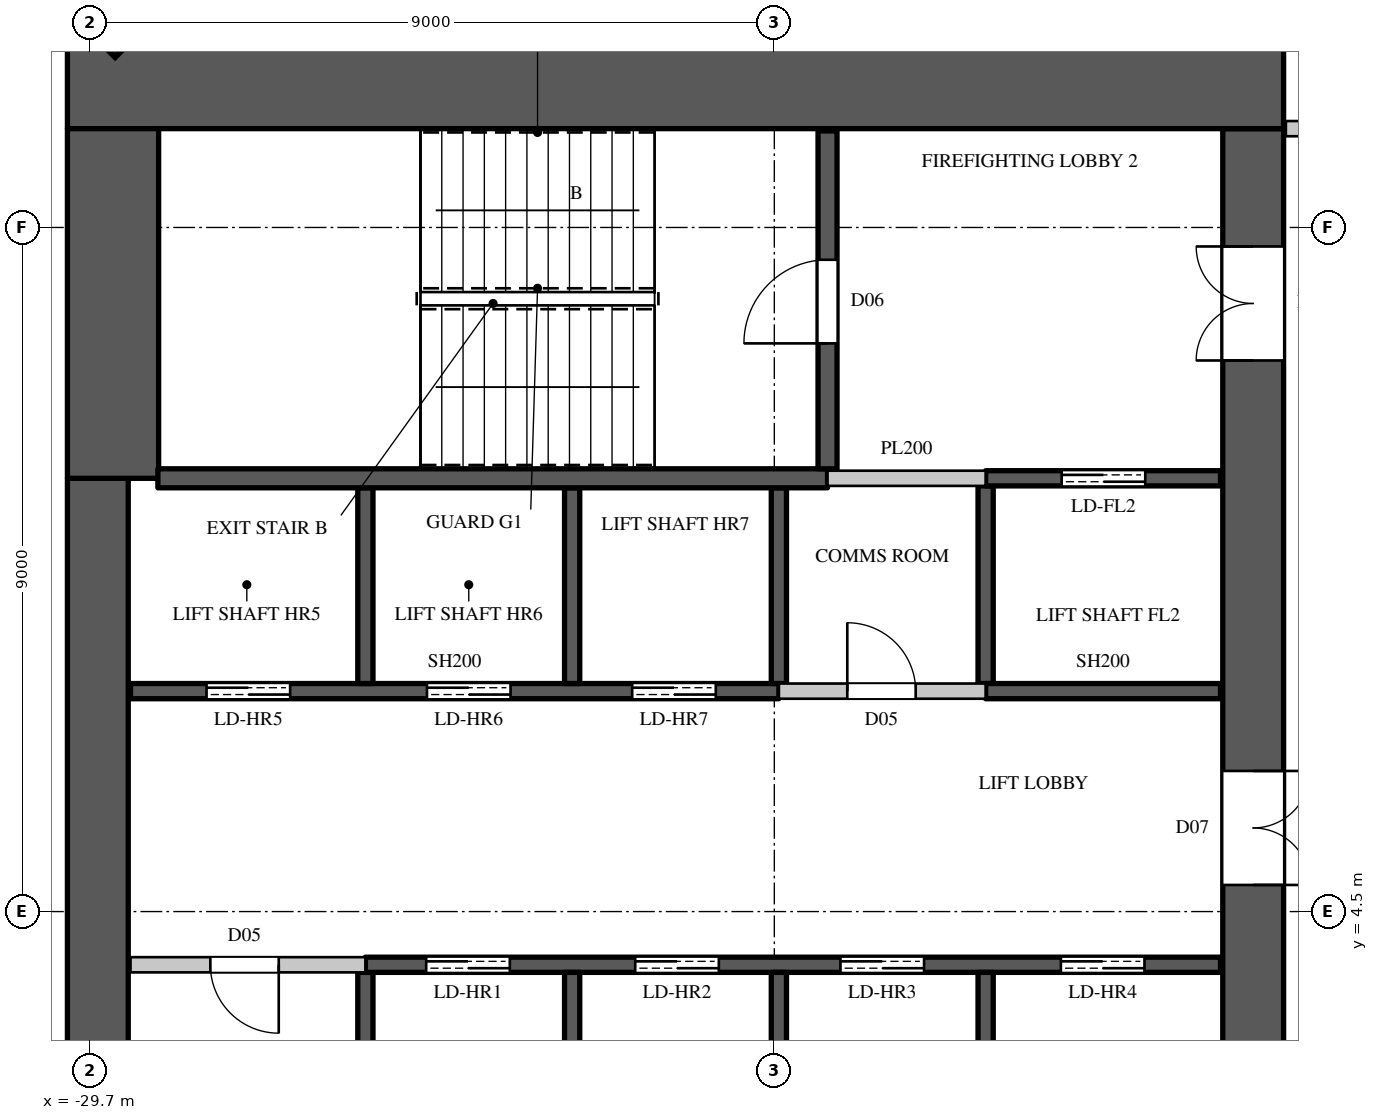
"""IFC4 building model, lengths in metres.
Left out: names, types, materials, properties, quantities, classifications, styles, units other than length and angle.
Written with IfcOpenShell. Run it as: python <this file> out.ifc"""

import sys

from ifc_helpers import new_model, si_unit, direction, frame, frame_2d, origin, origin_2d, place, context, subcontext, project, spatial, rectangle, extrude, element, fill, save


model = new_model("IFC4")
c1 = context("Model", 3, precision=1e-05, world=origin(), true_north=direction((0.0, 1.0)))
c2 = subcontext(c1, "Body", "Model", "MODEL_VIEW")
j1 = project(units=[si_unit("LENGTHUNIT", "METRE"), si_unit("PLANEANGLEUNIT", "RADIAN")], contexts=[c1])
p1 = place(None, origin())
s1 = spatial("IfcSite", under=j1, at=p1, CompositionType="ELEMENT")
p2 = place(p1, origin())
s2 = spatial("IfcBuilding", under=s1, at=p2, CompositionType="ELEMENT")
p3 = place(p2, frame((0.0, 0.0, 176.9)))
s3 = spatial("IfcBuildingStorey", under=s2, at=p3, CompositionType="ELEMENT", Elevation=176.9)
p4 = place(p3, frame((-29.443, 16.443, 0.0), z_axis=(0.0, 0.0, 1.0), x_axis=(-0.707106781187, -0.707106781187, 0.0)))
e1 = element("IfcColumn", 1, at=p4, inside=s3, PredefinedType="COLUMN", context=c2, shape_type="SweptSolid", body=[
    extrude(rectangle(XDim=0.9, YDim=1.1, at=origin_2d()), origin(), (0.0, 0.0, 1.0), 4.1),
])
p5 = place(p3, frame((-30.0, 15.4, 0.0), z_axis=(0.0, 0.0, 1.0), x_axis=(1.0, 0.0, 0.0)))
e2 = element("IfcWall", 2, at=p5, inside=s3, PredefinedType="SHEAR", context=c2, shape_type="SweptSolid", body=[
    extrude(rectangle(XDim=16.0, YDim=1.2, at=frame_2d((8.0, 0.0))), origin(), (0.0, 0.0, 1.0), 4.1),
])
p6 = place(p3, frame((-14.4, -14.8, 0.0), z_axis=(0.0, 0.0, 1.0), x_axis=(0.0, 1.0, 0.0)))
e3 = element("IfcWall", 3, at=p6, inside=s3, PredefinedType="SHEAR", context=c2, shape_type="SweptSolid", body=[
    extrude(rectangle(XDim=29.6, YDim=0.8, at=frame_2d((14.8, 0.0))), origin(), (0.0, 0.0, 1.0), 4.1),
])
p7 = place(p6, frame((1.55, 0.0, 0.0)))
e4 = element("IfcOpeningElement", 4, at=p7, cuts=e3, PredefinedType="OPENING", context=c2, shape_type="SweptSolid", body=[
    extrude(rectangle(XDim=1.5, YDim=2.4, at=frame_2d((0.75, 1.2))), frame((0.0, 0.41, 0.0), z_axis=(0.0, -1.0, 0.0), x_axis=(1.0, 0.0, 0.0)), (0.0, 0.0, 1.0), 0.82),
])
p8 = place(p6, frame((26.55, 0.0, 0.0)))
e5 = element("IfcOpeningElement", 5, at=p8, cuts=e3, PredefinedType="OPENING", context=c2, shape_type="SweptSolid", body=[
    extrude(rectangle(XDim=1.5, YDim=2.4, at=frame_2d((0.75, 1.2))), frame((0.0, 0.41, 0.0), z_axis=(0.0, -1.0, 0.0), x_axis=(1.0, 0.0, 0.0)), (0.0, 0.0, 1.0), 0.82),
])
p9 = place(p6, frame((8.45, 0.0, 0.0)))
e6 = element("IfcOpeningElement", 6, at=p9, cuts=e3, PredefinedType="OPENING", context=c2, shape_type="SweptSolid", body=[
    extrude(rectangle(XDim=1.5, YDim=2.4, at=frame_2d((0.75, 1.2))), frame((0.0, 0.41, 0.0), z_axis=(0.0, -1.0, 0.0), x_axis=(1.0, 0.0, 0.0)), (0.0, 0.0, 1.0), 0.82),
])
p10 = place(p6, frame((19.65, 0.0, 0.0)))
e7 = element("IfcOpeningElement", 7, at=p10, cuts=e3, PredefinedType="OPENING", context=c2, shape_type="SweptSolid", body=[
    extrude(rectangle(XDim=1.5, YDim=2.4, at=frame_2d((0.75, 1.2))), frame((0.0, 0.41, 0.0), z_axis=(0.0, -1.0, 0.0), x_axis=(1.0, 0.0, 0.0)), (0.0, 0.0, 1.0), 0.82),
])
p11 = place(p6, frame((14.5, 0.0, 0.0)))
e8 = element("IfcOpeningElement", 8, at=p11, cuts=e3, PredefinedType="OPENING", context=c2, shape_type="SweptSolid", body=[
    extrude(rectangle(XDim=0.6, YDim=2.0, at=frame_2d((0.3, 1.0))), frame((0.0, 0.41, 0.0), z_axis=(0.0, -1.0, 0.0), x_axis=(1.0, 0.0, 0.0)), (0.0, 0.0, 1.0), 0.82),
])
p12 = place(p3, frame((-29.6, -10.2, 0.0), z_axis=(0.0, 0.0, 1.0), x_axis=(0.0, 1.0, 0.0)))
e9 = element("IfcWall", 9, at=p12, inside=s3, PredefinedType="SHEAR", context=c2, shape_type="SweptSolid", body=[
    extrude(rectangle(XDim=20.4, YDim=0.8, at=frame_2d((10.2, 0.0))), origin(), (0.0, 0.0, 1.0), 4.1),
])
p13 = place(p3, frame((-29.4, 10.2, 0.0), z_axis=(0.0, 0.0, 1.0), x_axis=(0.0, 1.0, 0.0)))
e10 = element("IfcWall", 10, at=p13, inside=s3, PredefinedType="SHEAR", context=c2, shape_type="SweptSolid", body=[
    extrude(rectangle(XDim=4.6, YDim=1.2, at=frame_2d((2.3, 0.0))), origin(), (0.0, 0.0, 1.0), 4.1),
])
p14 = place(p3, frame((-29.17, 3.8, 0.0), z_axis=(0.0, 0.0, 1.0), x_axis=(1.0, 0.0, 0.0)))
e11 = element("IfcWall", 11, at=p14, inside=s3, PredefinedType="PARTITIONING", context=c2, shape_type="SweptSolid", body=[
    extrude(rectangle(XDim=3.09, YDim=0.2, at=frame_2d((1.545, 0.0))), origin(), (0.0, 0.0, 1.0), 3.8),
])
p15 = place(p14, frame((1.05, 0.0, 0.0)))
e12 = element("IfcOpeningElement", 12, at=p15, cuts=e11, PredefinedType="OPENING", context=c2, shape_type="SweptSolid", body=[
    extrude(rectangle(XDim=0.9, YDim=2.2, at=frame_2d((0.45, 1.1))), frame((0.0, 0.11, 0.0), z_axis=(0.0, -1.0, 0.0), x_axis=(1.0, 0.0, 0.0)), (0.0, 0.0, 1.0), 0.22),
])
p16 = place(p3, frame((-13.97, 14.8, 0.0), z_axis=(0.0, 0.0, 1.0), x_axis=(1.0, 0.0, 0.0)))
e13 = element("IfcWall", 13, at=p16, inside=s3, PredefinedType="PARTITIONING", context=c2, shape_type="SweptSolid", body=[
    extrude(rectangle(XDim=2.87, YDim=0.2, at=frame_2d((1.435, 0.0))), origin(), (0.0, 0.0, 1.0), 3.8),
])
p17 = place(p3, frame((-20.64, 7.4, 0.0), z_axis=(0.0, 0.0, 1.0), x_axis=(1.0, 0.0, 0.0)))
e14 = element("IfcWall", 14, at=p17, inside=s3, PredefinedType="PARTITIONING", context=c2, shape_type="SweptSolid", body=[
    extrude(rectangle(XDim=2.72, YDim=0.2, at=frame_2d((1.36, 0.0))), origin(), (0.0, 0.0, 1.0), 3.8),
])
p18 = place(p17, frame((0.9, 0.0, 0.0)))
e15 = element("IfcOpeningElement", 15, at=p18, cuts=e14, PredefinedType="OPENING", context=c2, shape_type="SweptSolid", body=[
    extrude(rectangle(XDim=0.9, YDim=2.2, at=frame_2d((0.45, 1.1))), frame((0.0, 0.11, 0.0), z_axis=(0.0, -1.0, 0.0), x_axis=(1.0, 0.0, 0.0)), (0.0, 0.0, 1.0), 0.22),
])
p19 = place(p3, frame((-20.0, 10.2, 0.0), z_axis=(0.0, 0.0, 1.0), x_axis=(1.0, 0.0, 0.0)))
e16 = element("IfcWall", 16, at=p19, inside=s3, PredefinedType="PARTITIONING", context=c2, shape_type="SweptSolid", body=[
    extrude(rectangle(XDim=2.08, YDim=0.2, at=frame_2d((1.04, 0.0))), origin(), (0.0, 0.0, 1.0), 3.8),
])
p20 = place(p3, frame((-29.17, 7.4, 0.0), z_axis=(0.0, 0.0, 1.0), x_axis=(1.0, 0.0, 0.0)))
e17 = element("IfcWall", 17, at=p20, inside=s3, PredefinedType="SHEAR", context=c2, shape_type="SweptSolid", body=[
    extrude(rectangle(XDim=8.53, YDim=0.2, at=frame_2d((4.265, 0.0))), origin(), (0.0, 0.0, 1.0), 3.8),
])
p21 = place(p20, frame((1.0, 0.0, 0.0)))
e18 = element("IfcOpeningElement", 18, at=p21, cuts=e17, PredefinedType="OPENING", context=c2, shape_type="SweptSolid", body=[
    extrude(rectangle(XDim=1.1, YDim=2.2, at=frame_2d((0.55, 1.1))), frame((0.0, 0.11, 0.0), z_axis=(0.0, -1.0, 0.0), x_axis=(1.0, 0.0, 0.0)), (0.0, 0.0, 1.0), 0.22),
])
p22 = place(p20, frame((3.9, 0.0, 0.0)))
e19 = element("IfcOpeningElement", 19, at=p22, cuts=e17, PredefinedType="OPENING", context=c2, shape_type="SweptSolid", body=[
    extrude(rectangle(XDim=1.1, YDim=2.2, at=frame_2d((0.55, 1.1))), frame((0.0, 0.11, 0.0), z_axis=(0.0, -1.0, 0.0), x_axis=(1.0, 0.0, 0.0)), (0.0, 0.0, 1.0), 0.22),
])
p23 = place(p20, frame((6.6, 0.0, 0.0)))
e20 = element("IfcOpeningElement", 20, at=p23, cuts=e17, PredefinedType="OPENING", context=c2, shape_type="SweptSolid", body=[
    extrude(rectangle(XDim=1.1, YDim=2.2, at=frame_2d((0.55, 1.1))), frame((0.0, 0.11, 0.0), z_axis=(0.0, -1.0, 0.0), x_axis=(1.0, 0.0, 0.0)), (0.0, 0.0, 1.0), 0.22),
])
p24 = place(p3, frame((-26.08, 1.1, 0.0), z_axis=(0.0, 0.0, 1.0), x_axis=(0.0, 1.0, 0.0)))
e21 = element("IfcWall", 21, at=p24, inside=s3, PredefinedType="SHEAR", context=c2, shape_type="SweptSolid", body=[
    extrude(rectangle(XDim=2.6, YDim=0.2, at=frame_2d((1.3, 0.0))), origin(), (0.0, 0.0, 1.0), 3.8),
])
p25 = place(p3, frame((-26.08, 3.8, 0.0), z_axis=(0.0, 0.0, 1.0), x_axis=(1.0, 0.0, 0.0)))
e22 = element("IfcWall", 22, at=p25, inside=s3, PredefinedType="SHEAR", context=c2, shape_type="SweptSolid", body=[
    extrude(rectangle(XDim=11.25, YDim=0.2, at=frame_2d((5.625, 0.0))), origin(), (0.0, 0.0, 1.0), 3.8),
])
p26 = place(p25, frame((0.8, 0.0, 0.0)))
e23 = element("IfcOpeningElement", 23, at=p26, cuts=e22, PredefinedType="OPENING", context=c2, shape_type="SweptSolid", body=[
    extrude(rectangle(XDim=1.1, YDim=2.2, at=frame_2d((0.55, 1.1))), frame((0.0, 0.11, 0.0), z_axis=(0.0, -1.0, 0.0), x_axis=(1.0, 0.0, 0.0)), (0.0, 0.0, 1.0), 0.22),
])
p27 = place(p25, frame((3.55, 0.0, 0.0)))
e24 = element("IfcOpeningElement", 24, at=p27, cuts=e22, PredefinedType="OPENING", context=c2, shape_type="SweptSolid", body=[
    extrude(rectangle(XDim=1.1, YDim=2.2, at=frame_2d((0.55, 1.1))), frame((0.0, 0.11, 0.0), z_axis=(0.0, -1.0, 0.0), x_axis=(1.0, 0.0, 0.0)), (0.0, 0.0, 1.0), 0.22),
])
p28 = place(p25, frame((6.25, 0.0, 0.0)))
e25 = element("IfcOpeningElement", 25, at=p28, cuts=e22, PredefinedType="OPENING", context=c2, shape_type="SweptSolid", body=[
    extrude(rectangle(XDim=1.1, YDim=2.2, at=frame_2d((0.55, 1.1))), frame((0.0, 0.11, 0.0), z_axis=(0.0, -1.0, 0.0), x_axis=(1.0, 0.0, 0.0)), (0.0, 0.0, 1.0), 0.22),
])
p29 = place(p25, frame((9.15, 0.0, 0.0)))
e26 = element("IfcOpeningElement", 26, at=p29, cuts=e22, PredefinedType="OPENING", context=c2, shape_type="SweptSolid", body=[
    extrude(rectangle(XDim=1.1, YDim=2.2, at=frame_2d((0.55, 1.1))), frame((0.0, 0.11, 0.0), z_axis=(0.0, -1.0, 0.0), x_axis=(1.0, 0.0, 0.0)), (0.0, 0.0, 1.0), 0.22),
])
p30 = place(p3, frame((-26.08, 7.5, 0.0), z_axis=(0.0, 0.0, 1.0), x_axis=(0.0, 1.0, 0.0)))
e27 = element("IfcWall", 27, at=p30, inside=s3, PredefinedType="SHEAR", context=c2, shape_type="SweptSolid", body=[
    extrude(rectangle(XDim=2.575, YDim=0.2, at=frame_2d((1.288, 0.0))), origin(), (0.0, 0.0, 1.0), 4.1),
])
p31 = place(p3, frame((-23.36, 1.1, 0.0), z_axis=(0.0, 0.0, 1.0), x_axis=(0.0, 1.0, 0.0)))
e28 = element("IfcWall", 28, at=p31, inside=s3, PredefinedType="SHEAR", context=c2, shape_type="SweptSolid", body=[
    extrude(rectangle(XDim=2.6, YDim=0.2, at=frame_2d((1.3, 0.0))), origin(), (0.0, 0.0, 1.0), 4.1),
])
p32 = place(p3, frame((-23.36, 7.5, 0.0), z_axis=(0.0, 0.0, 1.0), x_axis=(0.0, 1.0, 0.0)))
e29 = element("IfcWall", 29, at=p32, inside=s3, PredefinedType="SHEAR", context=c2, shape_type="SweptSolid", body=[
    extrude(rectangle(XDim=2.575, YDim=0.2, at=frame_2d((1.288, 0.0))), origin(), (0.0, 0.0, 1.0), 4.1),
])
p33 = place(p3, frame((-20.64, 1.1, 0.0), z_axis=(0.0, 0.0, 1.0), x_axis=(0.0, 1.0, 0.0)))
e30 = element("IfcWall", 30, at=p33, inside=s3, PredefinedType="SHEAR", context=c2, shape_type="SweptSolid", body=[
    extrude(rectangle(XDim=2.6, YDim=0.2, at=frame_2d((1.3, 0.0))), origin(), (0.0, 0.0, 1.0), 4.1),
])
p34 = place(p3, frame((-20.64, 7.5, 0.0), z_axis=(0.0, 0.0, 1.0), x_axis=(0.0, 1.0, 0.0)))
e31 = element("IfcWall", 31, at=p34, inside=s3, PredefinedType="SHEAR", context=c2, shape_type="SweptSolid", body=[
    extrude(rectangle(XDim=2.575, YDim=0.2, at=frame_2d((1.288, 0.0))), origin(), (0.0, 0.0, 1.0), 3.8),
])
p35 = place(p3, frame((-17.92, 1.1, 0.0), z_axis=(0.0, 0.0, 1.0), x_axis=(0.0, 1.0, 0.0)))
e32 = element("IfcWall", 32, at=p35, inside=s3, PredefinedType="SHEAR", context=c2, shape_type="SweptSolid", body=[
    extrude(rectangle(XDim=2.6, YDim=0.2, at=frame_2d((1.3, 0.0))), origin(), (0.0, 0.0, 1.0), 4.1),
])
p36 = place(p3, frame((-17.92, 7.5, 0.0), z_axis=(0.0, 0.0, 1.0), x_axis=(0.0, 1.0, 0.0)))
e33 = element("IfcWall", 33, at=p36, inside=s3, PredefinedType="SHEAR", context=c2, shape_type="SweptSolid", body=[
    extrude(rectangle(XDim=2.6, YDim=0.2, at=frame_2d((1.3, 0.0))), origin(), (0.0, 0.0, 1.0), 3.8),
])
p37 = place(p3, frame((-17.92, 7.4, 0.0), z_axis=(0.0, 0.0, 1.0), x_axis=(1.0, 0.0, 0.0)))
e34 = element("IfcWall", 34, at=p37, inside=s3, PredefinedType="SHEAR", context=c2, shape_type="SweptSolid", body=[
    extrude(rectangle(XDim=3.09, YDim=0.2, at=frame_2d((1.545, 0.0))), origin(), (0.0, 0.0, 1.0), 3.8),
])
p38 = place(p3, frame((-17.92, 10.2, 0.0), z_axis=(0.0, 0.0, 1.0), x_axis=(1.0, 0.0, 0.0)))
e35 = element("IfcWall", 35, at=p38, inside=s3, PredefinedType="SHEAR", context=c2, shape_type="SweptSolid", body=[
    extrude(rectangle(XDim=3.09, YDim=0.2, at=frame_2d((1.545, 0.0))), origin(), (0.0, 0.0, 1.0), 3.8),
])
p39 = place(p38, frame((1.0, 0.0, 0.0)))
e36 = element("IfcOpeningElement", 36, at=p39, cuts=e35, PredefinedType="OPENING", context=c2, shape_type="SweptSolid", body=[
    extrude(rectangle(XDim=1.1, YDim=2.2, at=frame_2d((0.55, 1.1))), frame((0.0, 0.11, 0.0), z_axis=(0.0, -1.0, 0.0), x_axis=(1.0, 0.0, 0.0)), (0.0, 0.0, 1.0), 0.22),
])
p40 = place(p3, frame((-28.81, 10.2, 0.0), z_axis=(0.0, 0.0, 1.0), x_axis=(1.0, 0.0, 0.0)))
e37 = element("IfcWall", 37, at=p40, inside=s3, PredefinedType="SHEAR", context=c2, shape_type="SweptSolid", body=[
    extrude(rectangle(XDim=8.81, YDim=0.25, at=frame_2d((4.405, 0.0))), origin(), (0.0, 0.0, 1.0), 3.8),
])
p41 = place(p3, frame((-20.0, 10.325, 0.0), z_axis=(0.0, 0.0, 1.0), x_axis=(0.0, 1.0, 0.0)))
e38 = element("IfcWall", 38, at=p41, inside=s3, PredefinedType="SHEAR", context=c2, shape_type="SweptSolid", body=[
    extrude(rectangle(XDim=4.445, YDim=0.25, at=frame_2d((2.223, 0.0))), origin(), (0.0, 0.0, 1.0), 3.8),
])
p42 = place(p41, frame((1.65, 0.0, 0.0)))
e39 = element("IfcOpeningElement", 39, at=p42, cuts=e38, PredefinedType="OPENING", context=c2, shape_type="SweptSolid", body=[
    extrude(rectangle(XDim=1.1, YDim=2.2, at=frame_2d((0.55, 1.1))), frame((0.0, 0.135, 0.0), z_axis=(0.0, -1.0, 0.0), x_axis=(1.0, 0.0, 0.0)), (0.0, 0.0, 1.0), 0.27),
])
p43 = place(p42, origin())
e40 = element("IfcDoor", 40, at=p43, inside=s3, OperationType="SINGLE_SWING_LEFT", PredefinedType="DOOR", context=c2, shape_type="SweptSolid", body=[
    extrude(rectangle(XDim=1.1, YDim=2.2, at=frame_2d((0.55, 1.1))), frame((0.0, 0.025, 0.0), z_axis=(0.0, -1.0, 0.0), x_axis=(1.0, 0.0, 0.0)), (0.0, 0.0, 1.0), 0.05),
])
fill(e39, e40)
p44 = place(p15, origin())
e41 = element("IfcDoor", 41, at=p44, inside=s3, OperationType="SINGLE_SWING_LEFT", PredefinedType="DOOR", context=c2, shape_type="SweptSolid", body=[
    extrude(rectangle(XDim=0.9, YDim=2.2, at=frame_2d((0.45, 1.1))), frame((0.0, 0.025, 0.0), z_axis=(0.0, -1.0, 0.0), x_axis=(1.0, 0.0, 0.0)), (0.0, 0.0, 1.0), 0.05),
])
fill(e12, e41)
p45 = place(p18, origin())
e42 = element("IfcDoor", 42, at=p45, inside=s3, OperationType="SINGLE_SWING_LEFT", PredefinedType="DOOR", context=c2, shape_type="SweptSolid", body=[
    extrude(rectangle(XDim=0.9, YDim=2.2, at=frame_2d((0.45, 1.1))), frame((0.0, 0.025, 0.0), z_axis=(0.0, -1.0, 0.0), x_axis=(1.0, 0.0, 0.0)), (0.0, 0.0, 1.0), 0.05),
])
fill(e15, e42)
p46 = place(p26, origin())
e43 = element("IfcDoor", 43, at=p46, inside=s3, OperationType="DOUBLE_DOOR_SLIDING", PredefinedType="DOOR", context=c2, shape_type="SweptSolid", body=[
    extrude(rectangle(XDim=1.1, YDim=2.2, at=frame_2d((0.55, 1.1))), frame((0.0, 0.025, 0.0), z_axis=(0.0, -1.0, 0.0), x_axis=(1.0, 0.0, 0.0)), (0.0, 0.0, 1.0), 0.05),
])
fill(e23, e43)
p47 = place(p27, origin())
e44 = element("IfcDoor", 44, at=p47, inside=s3, OperationType="DOUBLE_DOOR_SLIDING", PredefinedType="DOOR", context=c2, shape_type="SweptSolid", body=[
    extrude(rectangle(XDim=1.1, YDim=2.2, at=frame_2d((0.55, 1.1))), frame((0.0, 0.025, 0.0), z_axis=(0.0, -1.0, 0.0), x_axis=(1.0, 0.0, 0.0)), (0.0, 0.0, 1.0), 0.05),
])
fill(e24, e44)
p48 = place(p28, origin())
e45 = element("IfcDoor", 45, at=p48, inside=s3, OperationType="DOUBLE_DOOR_SLIDING", PredefinedType="DOOR", context=c2, shape_type="SweptSolid", body=[
    extrude(rectangle(XDim=1.1, YDim=2.2, at=frame_2d((0.55, 1.1))), frame((0.0, 0.025, 0.0), z_axis=(0.0, -1.0, 0.0), x_axis=(1.0, 0.0, 0.0)), (0.0, 0.0, 1.0), 0.05),
])
fill(e25, e45)
p49 = place(p29, origin())
e46 = element("IfcDoor", 46, at=p49, inside=s3, OperationType="DOUBLE_DOOR_SLIDING", PredefinedType="DOOR", context=c2, shape_type="SweptSolid", body=[
    extrude(rectangle(XDim=1.1, YDim=2.2, at=frame_2d((0.55, 1.1))), frame((0.0, 0.025, 0.0), z_axis=(0.0, -1.0, 0.0), x_axis=(1.0, 0.0, 0.0)), (0.0, 0.0, 1.0), 0.05),
])
fill(e26, e46)
p50 = place(p21, origin())
e47 = element("IfcDoor", 47, at=p50, inside=s3, OperationType="DOUBLE_DOOR_SLIDING", PredefinedType="DOOR", context=c2, shape_type="SweptSolid", body=[
    extrude(rectangle(XDim=1.1, YDim=2.2, at=frame_2d((0.55, 1.1))), frame((0.0, 0.025, 0.0), z_axis=(0.0, -1.0, 0.0), x_axis=(1.0, 0.0, 0.0)), (0.0, 0.0, 1.0), 0.05),
])
fill(e18, e47)
p51 = place(p22, origin())
e48 = element("IfcDoor", 48, at=p51, inside=s3, OperationType="DOUBLE_DOOR_SLIDING", PredefinedType="DOOR", context=c2, shape_type="SweptSolid", body=[
    extrude(rectangle(XDim=1.1, YDim=2.2, at=frame_2d((0.55, 1.1))), frame((0.0, 0.025, 0.0), z_axis=(0.0, -1.0, 0.0), x_axis=(1.0, 0.0, 0.0)), (0.0, 0.0, 1.0), 0.05),
])
fill(e19, e48)
p52 = place(p23, origin())
e49 = element("IfcDoor", 49, at=p52, inside=s3, OperationType="DOUBLE_DOOR_SLIDING", PredefinedType="DOOR", context=c2, shape_type="SweptSolid", body=[
    extrude(rectangle(XDim=1.1, YDim=2.2, at=frame_2d((0.55, 1.1))), frame((0.0, 0.025, 0.0), z_axis=(0.0, -1.0, 0.0), x_axis=(1.0, 0.0, 0.0)), (0.0, 0.0, 1.0), 0.05),
])
fill(e20, e49)
p53 = place(p39, origin())
e50 = element("IfcDoor", 50, at=p53, inside=s3, OperationType="DOUBLE_DOOR_SLIDING", PredefinedType="DOOR", context=c2, shape_type="SweptSolid", body=[
    extrude(rectangle(XDim=1.1, YDim=2.2, at=frame_2d((0.55, 1.1))), frame((0.0, 0.025, 0.0), z_axis=(0.0, -1.0, 0.0), x_axis=(1.0, 0.0, 0.0)), (0.0, 0.0, 1.0), 0.05),
])
fill(e36, e50)
p54 = place(p8, origin())
e51 = element("IfcDoor", 51, at=p54, inside=s3, OperationType="DOUBLE_DOOR_SINGLE_SWING", PredefinedType="DOOR", context=c2, shape_type="SweptSolid", body=[
    extrude(rectangle(XDim=1.5, YDim=2.4, at=frame_2d((0.75, 1.2))), frame((0.0, 0.395, 0.0), z_axis=(0.0, -1.0, 0.0), x_axis=(1.0, 0.0, 0.0)), (0.0, 0.0, 1.0), 0.05),
])
fill(e5, e51)
p55 = place(p10, origin())
e52 = element("IfcDoor", 52, at=p55, inside=s3, OperationType="DOUBLE_DOOR_SINGLE_SWING", PredefinedType="DOOR", context=c2, shape_type="SweptSolid", body=[
    extrude(rectangle(XDim=1.5, YDim=2.4, at=frame_2d((0.75, 1.2))), frame((0.0, -0.345, 0.0), z_axis=(0.0, -1.0, 0.0), x_axis=(1.0, 0.0, 0.0)), (0.0, 0.0, 1.0), 0.05),
])
fill(e7, e52)
save(model, sys.argv[1])
